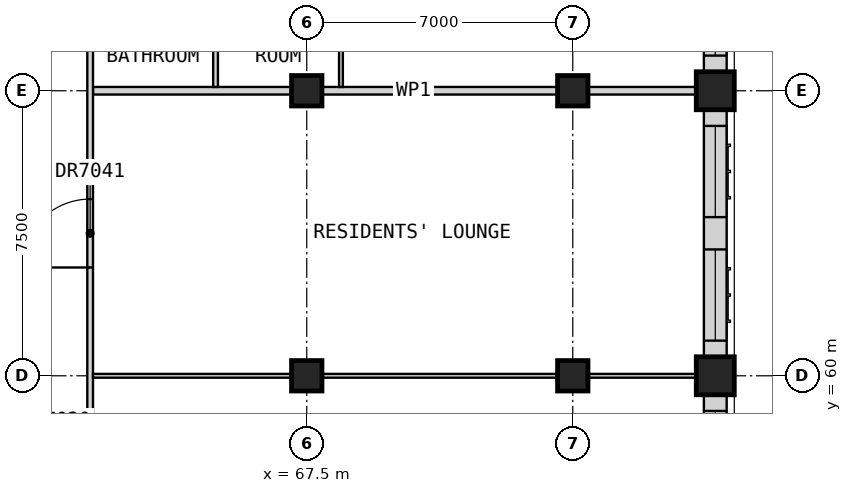
"""IFC4 building model, lengths in metres.
Left out: names, types, materials, properties, quantities, classifications, styles, units other than length and angle.
Written with IfcOpenShell. Run it as: python <this file> out.ifc"""

import sys

from ifc_helpers import new_model, si_unit, direction, frame, frame_2d, origin, origin_2d, place, context, subcontext, project, spatial, rectangle, extrude, element, fill, save


model = new_model("IFC4")
c1 = context("Model", 3, precision=1e-05, world=origin(), true_north=direction((0.0, 1.0)))
c2 = subcontext(c1, "Body", "Model", "MODEL_VIEW")
j1 = project(units=[si_unit("LENGTHUNIT", "METRE"), si_unit("PLANEANGLEUNIT", "RADIAN")], contexts=[c1])
p1 = place(None, origin())
s1 = spatial("IfcSite", under=j1, at=p1, CompositionType="ELEMENT")
p2 = place(p1, origin())
s2 = spatial("IfcBuilding", under=s1, at=p2, CompositionType="ELEMENT")
p3 = place(p2, frame((0.0, 0.0, 230.2)))
s3 = spatial("IfcBuildingStorey", under=s2, at=p3, CompositionType="ELEMENT", Elevation=230.2)
for number, where, z_axis, x_axis in (
    (1, (78.25, 60.0, 0.0), (0.0, 0.0, 1.0), (1.0, 0.0, 0.0)),
    (2, (78.25, 67.5, 0.0), (0.0, 0.0, 1.0), (1.0, 0.0, 0.0)),
):
    element("IfcColumn", number, at=place(p3, frame(where, z_axis=z_axis, x_axis=x_axis)), inside=s3, PredefinedType="COLUMN", context=c2, shape_type="SweptSolid", body=[
        extrude(rectangle(XDim=1.0, YDim=1.0, at=origin_2d()), origin(), (0.0, 0.0, 1.0), 3.5),
    ])
for number, where, z_axis, x_axis in (
    (3, (67.5, 60.0, 0.0), (0.0, 0.0, 1.0), (1.0, 0.0, 0.0)),
    (4, (67.5, 67.5, 0.0), (0.0, 0.0, 1.0), (1.0, 0.0, 0.0)),
    (5, (74.5, 60.0, 0.0), (0.0, 0.0, 1.0), (1.0, 0.0, 0.0)),
    (6, (74.5, 67.5, 0.0), (0.0, 0.0, 1.0), (1.0, 0.0, 0.0)),
):
    element("IfcColumn", number, at=place(p3, frame(where, z_axis=z_axis, x_axis=x_axis)), inside=s3, PredefinedType="COLUMN", context=c2, shape_type="SweptSolid", body=[
        extrude(rectangle(XDim=0.8, YDim=0.8, at=origin_2d()), origin(), (0.0, 0.0, 1.0), 3.5),
    ])
p4 = place(p3, frame((78.25, 53.0, 0.0), z_axis=(0.0, 0.0, 1.0), x_axis=(0.0, 1.0, 0.0)))
e7 = element("IfcWall", 7, at=p4, inside=s3, PredefinedType="SOLIDWALL", context=c2, shape_type="SweptSolid", body=[
    extrude(rectangle(XDim=6.5, YDim=0.6, at=frame_2d((3.25, 0.0))), origin(), (0.0, 0.0, 1.0), 2.75),
])
p5 = place(p4, frame((0.425, 0.0, 0.8)))
e8 = element("IfcOpeningElement", 8, at=p5, cuts=e7, PredefinedType="OPENING", context=c2, shape_type="SweptSolid", body=[
    extrude(rectangle(XDim=2.4, YDim=1.8, at=frame_2d((1.2, 0.9))), frame((0.0, 0.31, 0.0), z_axis=(0.0, -1.0, 0.0), x_axis=(1.0, 0.0, 0.0)), (0.0, 0.0, 1.0), 0.62),
])
p6 = place(p4, frame((3.675, 0.0, 0.8)))
e9 = element("IfcOpeningElement", 9, at=p6, cuts=e7, PredefinedType="OPENING", context=c2, shape_type="SweptSolid", body=[
    extrude(rectangle(XDim=2.4, YDim=1.8, at=frame_2d((1.2, 0.9))), frame((0.0, 0.31, 0.0), z_axis=(0.0, -1.0, 0.0), x_axis=(1.0, 0.0, 0.0)), (0.0, 0.0, 1.0), 0.62),
])
p7 = place(p3, frame((78.25, 60.5, 0.0), z_axis=(0.0, 0.0, 1.0), x_axis=(0.0, 1.0, 0.0)))
e10 = element("IfcWall", 10, at=p7, inside=s3, PredefinedType="SOLIDWALL", context=c2, shape_type="SweptSolid", body=[
    extrude(rectangle(XDim=6.5, YDim=0.6, at=frame_2d((3.25, 0.0))), origin(), (0.0, 0.0, 1.0), 2.75),
])
p8 = place(p7, frame((0.425, 0.0, 0.8)))
e11 = element("IfcOpeningElement", 11, at=p8, cuts=e10, PredefinedType="OPENING", context=c2, shape_type="SweptSolid", body=[
    extrude(rectangle(XDim=2.4, YDim=1.8, at=frame_2d((1.2, 0.9))), frame((0.0, 0.31, 0.0), z_axis=(0.0, -1.0, 0.0), x_axis=(1.0, 0.0, 0.0)), (0.0, 0.0, 1.0), 0.62),
])
p9 = place(p7, frame((3.675, 0.0, 0.8)))
e12 = element("IfcOpeningElement", 12, at=p9, cuts=e10, PredefinedType="OPENING", context=c2, shape_type="SweptSolid", body=[
    extrude(rectangle(XDim=2.4, YDim=1.8, at=frame_2d((1.2, 0.9))), frame((0.0, 0.31, 0.0), z_axis=(0.0, -1.0, 0.0), x_axis=(1.0, 0.0, 0.0)), (0.0, 0.0, 1.0), 0.62),
])
p10 = place(p3, frame((78.25, 68.0, 0.0), z_axis=(0.0, 0.0, 1.0), x_axis=(0.0, 1.0, 0.0)))
e13 = element("IfcWall", 13, at=p10, inside=s3, PredefinedType="SOLIDWALL", context=c2, shape_type="SweptSolid", body=[
    extrude(rectangle(XDim=6.5, YDim=0.6, at=frame_2d((3.25, 0.0))), origin(), (0.0, 0.0, 1.0), 2.75),
])
p11 = place(p10, frame((0.425, 0.0, 0.8)))
e14 = element("IfcOpeningElement", 14, at=p11, cuts=e13, PredefinedType="OPENING", context=c2, shape_type="SweptSolid", body=[
    extrude(rectangle(XDim=2.4, YDim=1.8, at=frame_2d((1.2, 0.9))), frame((0.0, 0.31, 0.0), z_axis=(0.0, -1.0, 0.0), x_axis=(1.0, 0.0, 0.0)), (0.0, 0.0, 1.0), 0.62),
])
p12 = place(p10, frame((3.675, 0.0, 0.8)))
e15 = element("IfcOpeningElement", 15, at=p12, cuts=e13, PredefinedType="OPENING", context=c2, shape_type="SweptSolid", body=[
    extrude(rectangle(XDim=2.4, YDim=1.8, at=frame_2d((1.2, 0.9))), frame((0.0, 0.31, 0.0), z_axis=(0.0, -1.0, 0.0), x_axis=(1.0, 0.0, 0.0)), (0.0, 0.0, 1.0), 0.62),
])
p13 = place(p3, frame((61.875, 67.5, 0.0), z_axis=(0.0, 0.0, 1.0), x_axis=(1.0, 0.0, 0.0)))
e16 = element("IfcWall", 16, at=p13, inside=s3, PredefinedType="PARTITIONING", context=c2, shape_type="SweptSolid", body=[
    extrude(rectangle(XDim=16.875, YDim=0.2, at=frame_2d((8.438, 0.0))), origin(), (0.0, 0.0, 1.0), 3.25),
])
p14 = place(p3, frame((61.8, 58.275, 0.0), z_axis=(0.0, 0.0, 1.0), x_axis=(0.0, 1.0, 0.0)))
e17 = element("IfcWall", 17, at=p14, inside=s3, PredefinedType="PARTITIONING", context=c2, shape_type="SweptSolid", body=[
    extrude(rectangle(XDim=25.95, YDim=0.15, at=frame_2d((12.975, 0.0))), origin(), (0.0, 0.0, 1.0), 3.25),
])
p15 = place(p14, frame((4.575, 0.0, 0.0)))
e18 = element("IfcOpeningElement", 18, at=p15, cuts=e17, PredefinedType="OPENING", context=c2, shape_type="SweptSolid", body=[
    extrude(rectangle(XDim=1.8, YDim=2.1, at=frame_2d((0.9, 1.05))), frame((0.0, 0.085, 0.0), z_axis=(0.0, -1.0, 0.0), x_axis=(1.0, 0.0, 0.0)), (0.0, 0.0, 1.0), 0.17),
])
p16 = place(p14, frame((14.4, 0.0, 0.0)))
e19 = element("IfcOpeningElement", 19, at=p16, cuts=e17, PredefinedType="OPENING", context=c2, shape_type="SweptSolid", body=[
    extrude(rectangle(XDim=0.9, YDim=2.1, at=frame_2d((0.45, 1.05))), frame((0.0, 0.085, 0.0), z_axis=(0.0, -1.0, 0.0), x_axis=(1.0, 0.0, 0.0)), (0.0, 0.0, 1.0), 0.17),
])
p17 = place(p3, frame((61.875, 60.0, 0.0), z_axis=(0.0, 0.0, 1.0), x_axis=(1.0, 0.0, 0.0)))
e20 = element("IfcWall", 20, at=p17, inside=s3, PredefinedType="PARTITIONING", context=c2, shape_type="SweptSolid", body=[
    extrude(rectangle(XDim=16.875, YDim=0.1, at=frame_2d((8.438, 0.0))), origin(), (0.0, 0.0, 1.0), 3.25),
])
p18 = place(p3, frame((68.4, 67.6, 0.0), z_axis=(0.0, 0.0, 1.0), x_axis=(0.0, 1.0, 0.0)))
e21 = element("IfcWall", 21, at=p18, inside=s3, PredefinedType="PARTITIONING", context=c2, shape_type="SweptSolid", body=[
    extrude(rectangle(XDim=14.8, YDim=0.1, at=frame_2d((7.4, 0.0))), origin(), (0.0, 0.0, 1.0), 3.25),
])
p19 = place(p18, frame((1.325, 0.0, 0.0)))
e22 = element("IfcOpeningElement", 22, at=p19, cuts=e21, PredefinedType="OPENING", context=c2, shape_type="SweptSolid", body=[
    extrude(rectangle(XDim=0.9, YDim=2.1, at=frame_2d((0.45, 1.05))), frame((0.0, 0.06, 0.0), z_axis=(0.0, -1.0, 0.0), x_axis=(1.0, 0.0, 0.0)), (0.0, 0.0, 1.0), 0.12),
])
p20 = place(p18, frame((5.075, 0.0, 0.0)))
e23 = element("IfcOpeningElement", 23, at=p20, cuts=e21, PredefinedType="OPENING", context=c2, shape_type="SweptSolid", body=[
    extrude(rectangle(XDim=0.9, YDim=2.1, at=frame_2d((0.45, 1.05))), frame((0.0, 0.06, 0.0), z_axis=(0.0, -1.0, 0.0), x_axis=(1.0, 0.0, 0.0)), (0.0, 0.0, 1.0), 0.12),
])
p21 = place(p18, frame((12.575, 0.0, 0.0)))
e24 = element("IfcOpeningElement", 24, at=p21, cuts=e21, PredefinedType="OPENING", context=c2, shape_type="SweptSolid", body=[
    extrude(rectangle(XDim=0.9, YDim=2.1, at=frame_2d((0.45, 1.05))), frame((0.0, 0.06, 0.0), z_axis=(0.0, -1.0, 0.0), x_axis=(1.0, 0.0, 0.0)), (0.0, 0.0, 1.0), 0.12),
])
p22 = place(p3, frame((65.1, 67.6, 0.0), z_axis=(0.0, 0.0, 1.0), x_axis=(0.0, 1.0, 0.0)))
e25 = element("IfcWall", 25, at=p22, inside=s3, PredefinedType="PARTITIONING", context=c2, shape_type="SweptSolid", body=[
    extrude(rectangle(XDim=3.587, YDim=0.125, at=frame_2d((1.794, 0.0))), origin(), (0.0, 0.0, 1.0), 3.25),
])
p23 = place(p22, frame((1.325, 0.0, 0.0)))
e26 = element("IfcOpeningElement", 26, at=p23, cuts=e25, PredefinedType="OPENING", context=c2, shape_type="SweptSolid", body=[
    extrude(rectangle(XDim=0.9, YDim=2.1, at=frame_2d((0.45, 1.05))), frame((0.0, 0.073, 0.0), z_axis=(0.0, -1.0, 0.0), x_axis=(1.0, 0.0, 0.0)), (0.0, 0.0, 1.0), 0.145),
])
p24 = place(p6, origin())
e27 = element("IfcWindow", 27, at=p24, inside=s3, PartitioningType="SINGLE_PANEL", PredefinedType="WINDOW", context=c2, shape_type="SweptSolid", body=[
    extrude(rectangle(XDim=2.4, YDim=1.8, at=frame_2d((1.2, 0.9))), frame((0.0, -0.07, 0.0), z_axis=(0.0, -1.0, 0.0), x_axis=(1.0, 0.0, 0.0)), (0.0, 0.0, 1.0), 0.06),
])
fill(e9, e27)
p25 = place(p8, origin())
e28 = element("IfcWindow", 28, at=p25, inside=s3, PartitioningType="SINGLE_PANEL", PredefinedType="WINDOW", context=c2, shape_type="SweptSolid", body=[
    extrude(rectangle(XDim=2.4, YDim=1.8, at=frame_2d((1.2, 0.9))), frame((0.0, -0.07, 0.0), z_axis=(0.0, -1.0, 0.0), x_axis=(1.0, 0.0, 0.0)), (0.0, 0.0, 1.0), 0.06),
])
fill(e11, e28)
p26 = place(p9, origin())
e29 = element("IfcWindow", 29, at=p26, inside=s3, PartitioningType="SINGLE_PANEL", PredefinedType="WINDOW", context=c2, shape_type="SweptSolid", body=[
    extrude(rectangle(XDim=2.4, YDim=1.8, at=frame_2d((1.2, 0.9))), frame((0.0, -0.07, 0.0), z_axis=(0.0, -1.0, 0.0), x_axis=(1.0, 0.0, 0.0)), (0.0, 0.0, 1.0), 0.06),
])
fill(e12, e29)
p27 = place(p11, origin())
e30 = element("IfcWindow", 30, at=p27, inside=s3, PartitioningType="SINGLE_PANEL", PredefinedType="WINDOW", context=c2, shape_type="SweptSolid", body=[
    extrude(rectangle(XDim=2.4, YDim=1.8, at=frame_2d((1.2, 0.9))), frame((0.0, -0.07, 0.0), z_axis=(0.0, -1.0, 0.0), x_axis=(1.0, 0.0, 0.0)), (0.0, 0.0, 1.0), 0.06),
])
fill(e14, e30)
p28 = place(p15, origin())
e31 = element("IfcDoor", 31, at=p28, inside=s3, OperationType="DOUBLE_DOOR_SINGLE_SWING", PredefinedType="DOOR", context=c2, shape_type="SweptSolid", body=[
    extrude(rectangle(XDim=1.8, YDim=2.1, at=frame_2d((0.9, 1.05))), frame((0.0, 0.025, 0.0), z_axis=(0.0, -1.0, 0.0), x_axis=(1.0, 0.0, 0.0)), (0.0, 0.0, 1.0), 0.05),
])
fill(e18, e31)
save(model, sys.argv[1])
